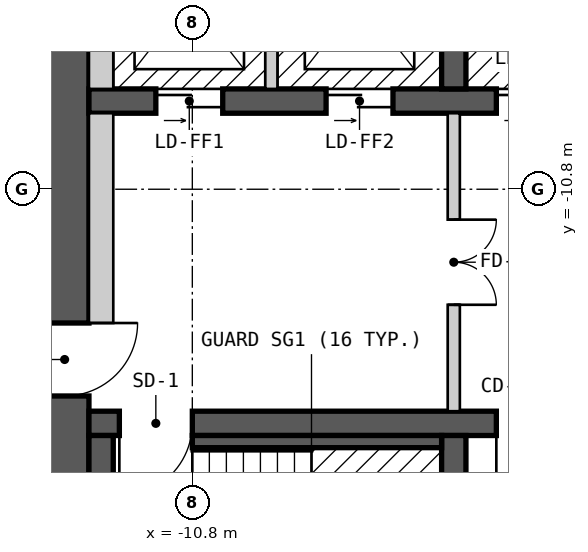
"""IFC4 building model, lengths in metres.
Left out: names, types, materials, properties, quantities, classifications, styles, units other than length and angle.
Written with IfcOpenShell. Run it as: python <this file> out.ifc"""

import sys

from ifc_helpers import new_model, si_unit, direction, frame, frame_2d, origin, place, context, subcontext, project, spatial, rectangle, extrude, element, fill, save


model = new_model("IFC4")
c1 = context("Model", 3, precision=1e-05, world=origin(), true_north=direction((0.0, 1.0)))
c2 = subcontext(c1, "Body", "Model", "MODEL_VIEW")
j1 = project(units=[si_unit("LENGTHUNIT", "METRE"), si_unit("PLANEANGLEUNIT", "RADIAN")], contexts=[c1])
p1 = place(None, origin())
s1 = spatial("IfcSite", under=j1, at=p1, CompositionType="ELEMENT")
p2 = place(p1, origin())
s2 = spatial("IfcBuilding", under=s1, at=p2, CompositionType="ELEMENT")
p3 = place(p2, frame((0.0, 0.0, 135.6)))
s3 = spatial("IfcBuildingStorey", under=s2, at=p3, CompositionType="ELEMENT", Elevation=135.6)
p4 = place(p3, frame((-12.9, -18.2, 0.0), z_axis=(0.0, 0.0, 1.0), x_axis=(0.0, 1.0, 0.0)))
e1 = element("IfcWall", 1, at=p4, inside=s3, PredefinedType="SHEAR", context=c2, shape_type="SweptSolid", body=[
    extrude(rectangle(XDim=12.4, YDim=0.8, at=frame_2d((6.2, 0.0))), origin(), (0.0, 0.0, 1.0), 2.7),
])
p5 = place(p4, frame((4.0, 0.0, 0.0)))
e2 = element("IfcOpeningElement", 2, at=p5, cuts=e1, PredefinedType="OPENING", context=c2, shape_type="SweptSolid", body=[
    extrude(rectangle(XDim=1.2, YDim=2.1, at=frame_2d((0.6, 1.05))), frame((0.0, 0.41, 0.0), z_axis=(0.0, -1.0, 0.0), x_axis=(1.0, 0.0, 0.0)), (0.0, 0.0, 1.0), 0.82),
])
p6 = place(p3, frame((-12.5, -14.65, 0.0), z_axis=(0.0, 0.0, 1.0), x_axis=(1.0, 0.0, 0.0)))
e3 = element("IfcWall", 3, at=p6, inside=s3, PredefinedType="SHEAR", context=c2, shape_type="SweptSolid", body=[
    extrude(rectangle(XDim=25.0, YDim=0.4, at=frame_2d((12.5, 0.0))), origin(), (0.0, 0.0, 1.0), 2.7),
])
p7 = place(p6, frame((1.7, 0.0, 0.0), z_axis=(0.0, 0.0, 1.0), x_axis=(-1.0, 0.0, 0.0)))
e4 = element("IfcOpeningElement", 4, at=p7, cuts=e3, PredefinedType="OPENING", context=c2, shape_type="SweptSolid", body=[
    extrude(rectangle(XDim=1.2, YDim=2.1, at=frame_2d((0.6, 1.05))), frame((0.0, 0.21, 0.0), z_axis=(0.0, -1.0, 0.0), x_axis=(1.0, 0.0, 0.0)), (0.0, 0.0, 1.0), 0.42),
])
p8 = place(p6, frame((24.55, 0.0, 0.0), z_axis=(0.0, 0.0, 1.0), x_axis=(-1.0, 0.0, 0.0)))
e5 = element("IfcOpeningElement", 5, at=p8, cuts=e3, PredefinedType="OPENING", context=c2, shape_type="SweptSolid", body=[
    extrude(rectangle(XDim=1.2, YDim=2.1, at=frame_2d((0.6, 1.05))), frame((0.0, 0.21, 0.0), z_axis=(0.0, -1.0, 0.0), x_axis=(1.0, 0.0, 0.0)), (0.0, 0.0, 1.0), 0.42),
])
p9 = place(p6, frame((7.6, 0.0, 0.0), z_axis=(0.0, 0.0, 1.0), x_axis=(-1.0, 0.0, 0.0)))
e6 = element("IfcOpeningElement", 6, at=p9, cuts=e3, PredefinedType="OPENING", context=c2, shape_type="SweptSolid", body=[
    extrude(rectangle(XDim=0.9, YDim=2.1, at=frame_2d((0.45, 1.05))), frame((0.0, 0.21, 0.0), z_axis=(0.0, -1.0, 0.0), x_axis=(1.0, 0.0, 0.0)), (0.0, 0.0, 1.0), 0.42),
])
p10 = place(p6, frame((9.65, 0.0, 0.0), z_axis=(0.0, 0.0, 1.0), x_axis=(-1.0, 0.0, 0.0)))
e7 = element("IfcOpeningElement", 7, at=p10, cuts=e3, PredefinedType="OPENING", context=c2, shape_type="SweptSolid", body=[
    extrude(rectangle(XDim=0.9, YDim=2.1, at=frame_2d((0.45, 1.05))), frame((0.0, 0.21, 0.0), z_axis=(0.0, -1.0, 0.0), x_axis=(1.0, 0.0, 0.0)), (0.0, 0.0, 1.0), 0.42),
])
p11 = place(p6, frame((11.95, 0.0, 0.0), z_axis=(0.0, 0.0, 1.0), x_axis=(-1.0, 0.0, 0.0)))
e8 = element("IfcOpeningElement", 8, at=p11, cuts=e3, PredefinedType="OPENING", context=c2, shape_type="SweptSolid", body=[
    extrude(rectangle(XDim=1.0, YDim=2.1, at=frame_2d((0.5, 1.05))), frame((0.0, 0.21, 0.0), z_axis=(0.0, -1.0, 0.0), x_axis=(1.0, 0.0, 0.0)), (0.0, 0.0, 1.0), 0.42),
])
p12 = place(p6, frame((14.15, 0.0, 0.0), z_axis=(0.0, 0.0, 1.0), x_axis=(-1.0, 0.0, 0.0)))
e9 = element("IfcOpeningElement", 9, at=p12, cuts=e3, PredefinedType="OPENING", context=c2, shape_type="SweptSolid", body=[
    extrude(rectangle(XDim=0.9, YDim=2.1, at=frame_2d((0.45, 1.05))), frame((0.0, 0.21, 0.0), z_axis=(0.0, -1.0, 0.0), x_axis=(1.0, 0.0, 0.0)), (0.0, 0.0, 1.0), 0.42),
])
p13 = place(p6, frame((16.15, 0.0, 0.0), z_axis=(0.0, 0.0, 1.0), x_axis=(-1.0, 0.0, 0.0)))
e10 = element("IfcOpeningElement", 10, at=p13, cuts=e3, PredefinedType="OPENING", context=c2, shape_type="SweptSolid", body=[
    extrude(rectangle(XDim=0.9, YDim=2.1, at=frame_2d((0.45, 1.05))), frame((0.0, 0.21, 0.0), z_axis=(0.0, -1.0, 0.0), x_axis=(1.0, 0.0, 0.0)), (0.0, 0.0, 1.0), 0.42),
])
p14 = place(p6, frame((18.3, 0.0, 0.0), z_axis=(0.0, 0.0, 1.0), x_axis=(-1.0, 0.0, 0.0)))
e11 = element("IfcOpeningElement", 11, at=p14, cuts=e3, PredefinedType="OPENING", context=c2, shape_type="SweptSolid", body=[
    extrude(rectangle(XDim=1.0, YDim=2.1, at=frame_2d((0.5, 1.05))), frame((0.0, 0.21, 0.0), z_axis=(0.0, -1.0, 0.0), x_axis=(1.0, 0.0, 0.0)), (0.0, 0.0, 1.0), 0.42),
])
p15 = place(p3, frame((-12.5, -9.35, 0.0), z_axis=(0.0, 0.0, 1.0), x_axis=(1.0, 0.0, 0.0)))
e12 = element("IfcWall", 12, at=p15, inside=s3, PredefinedType="SHEAR", context=c2, shape_type="SweptSolid", body=[
    extrude(rectangle(XDim=22.7, YDim=0.4, at=frame_2d((11.35, 0.0))), origin(), (0.0, 0.0, 1.0), 2.7),
])
p16 = place(p15, frame((1.1, 0.0, 0.0)))
e13 = element("IfcOpeningElement", 13, at=p16, cuts=e12, PredefinedType="OPENING", context=c2, shape_type="SweptSolid", body=[
    extrude(rectangle(XDim=1.1, YDim=2.1, at=frame_2d((0.55, 1.05))), frame((0.0, 0.21, 0.0), z_axis=(0.0, -1.0, 0.0), x_axis=(1.0, 0.0, 0.0)), (0.0, 0.0, 1.0), 0.42),
])
p17 = place(p15, frame((3.9, 0.0, 0.0)))
e14 = element("IfcOpeningElement", 14, at=p17, cuts=e12, PredefinedType="OPENING", context=c2, shape_type="SweptSolid", body=[
    extrude(rectangle(XDim=1.1, YDim=2.1, at=frame_2d((0.55, 1.05))), frame((0.0, 0.21, 0.0), z_axis=(0.0, -1.0, 0.0), x_axis=(1.0, 0.0, 0.0)), (0.0, 0.0, 1.0), 0.42),
])
p18 = place(p15, frame((6.7, 0.0, 0.0)))
e15 = element("IfcOpeningElement", 15, at=p18, cuts=e12, PredefinedType="OPENING", context=c2, shape_type="SweptSolid", body=[
    extrude(rectangle(XDim=1.1, YDim=2.1, at=frame_2d((0.55, 1.05))), frame((0.0, 0.21, 0.0), z_axis=(0.0, -1.0, 0.0), x_axis=(1.0, 0.0, 0.0)), (0.0, 0.0, 1.0), 0.42),
])
p19 = place(p15, frame((9.0, 0.0, 0.0)))
e16 = element("IfcOpeningElement", 16, at=p19, cuts=e12, PredefinedType="OPENING", context=c2, shape_type="SweptSolid", body=[
    extrude(rectangle(XDim=1.1, YDim=2.1, at=frame_2d((0.55, 1.05))), frame((0.0, 0.21, 0.0), z_axis=(0.0, -1.0, 0.0), x_axis=(1.0, 0.0, 0.0)), (0.0, 0.0, 1.0), 0.42),
])
p20 = place(p15, frame((11.3, 0.0, 0.0)))
e17 = element("IfcOpeningElement", 17, at=p20, cuts=e12, PredefinedType="OPENING", context=c2, shape_type="SweptSolid", body=[
    extrude(rectangle(XDim=1.1, YDim=2.1, at=frame_2d((0.55, 1.05))), frame((0.0, 0.21, 0.0), z_axis=(0.0, -1.0, 0.0), x_axis=(1.0, 0.0, 0.0)), (0.0, 0.0, 1.0), 0.42),
])
p21 = place(p15, frame((13.6, 0.0, 0.0)))
e18 = element("IfcOpeningElement", 18, at=p21, cuts=e12, PredefinedType="OPENING", context=c2, shape_type="SweptSolid", body=[
    extrude(rectangle(XDim=1.1, YDim=2.1, at=frame_2d((0.55, 1.05))), frame((0.0, 0.21, 0.0), z_axis=(0.0, -1.0, 0.0), x_axis=(1.0, 0.0, 0.0)), (0.0, 0.0, 1.0), 0.42),
])
p22 = place(p15, frame((15.9, 0.0, 0.0)))
e19 = element("IfcOpeningElement", 19, at=p22, cuts=e12, PredefinedType="OPENING", context=c2, shape_type="SweptSolid", body=[
    extrude(rectangle(XDim=1.1, YDim=2.1, at=frame_2d((0.55, 1.05))), frame((0.0, 0.21, 0.0), z_axis=(0.0, -1.0, 0.0), x_axis=(1.0, 0.0, 0.0)), (0.0, 0.0, 1.0), 0.42),
])
p23 = place(p15, frame((18.2, 0.0, 0.0)))
e20 = element("IfcOpeningElement", 20, at=p23, cuts=e12, PredefinedType="OPENING", context=c2, shape_type="SweptSolid", body=[
    extrude(rectangle(XDim=1.1, YDim=2.1, at=frame_2d((0.55, 1.05))), frame((0.0, 0.21, 0.0), z_axis=(0.0, -1.0, 0.0), x_axis=(1.0, 0.0, 0.0)), (0.0, 0.0, 1.0), 0.42),
])
p24 = place(p15, frame((20.6, 0.0, 0.0)))
e21 = element("IfcOpeningElement", 21, at=p24, cuts=e12, PredefinedType="OPENING", context=c2, shape_type="SweptSolid", body=[
    extrude(rectangle(XDim=1.1, YDim=2.1, at=frame_2d((0.55, 1.05))), frame((0.0, 0.21, 0.0), z_axis=(0.0, -1.0, 0.0), x_axis=(1.0, 0.0, 0.0)), (0.0, 0.0, 1.0), 0.42),
])
for number, where, z_axis, x_axis in (
    (22, (-6.5, -18.2, 0.0), (0.0, 0.0, 1.0), (0.0, 1.0, 0.0)),
    (23, (-6.5, -9.15, 0.0), (0.0, 0.0, 1.0), (0.0, 1.0, 0.0)),
):
    element("IfcWall", number, at=place(p3, frame(where, z_axis=z_axis, x_axis=x_axis)), inside=s3, PredefinedType="SHEAR", context=c2, shape_type="SweptSolid", body=[
        extrude(rectangle(XDim=3.35, YDim=0.4, at=frame_2d((1.675, 0.0))), origin(), (0.0, 0.0, 1.0), 2.7),
    ])
p25 = place(p3, frame((-12.3, -18.2, 0.0), z_axis=(0.0, 0.0, 1.0), x_axis=(0.0, 1.0, 0.0)))
e24 = element("IfcWall", 24, at=p25, inside=s3, PredefinedType="SOLIDWALL", context=c2, shape_type="SweptSolid", body=[
    extrude(rectangle(XDim=3.35, YDim=0.4, at=frame_2d((1.675, 0.0))), origin(), (0.0, 0.0, 1.0), 2.7),
])
p26 = place(p3, frame((-12.3, -13.0, 0.0), z_axis=(0.0, 0.0, 1.0), x_axis=(0.0, 1.0, 0.0)))
e25 = element("IfcWall", 25, at=p26, inside=s3, PredefinedType="PARTITIONING", context=c2, shape_type="SweptSolid", body=[
    extrude(rectangle(XDim=3.45, YDim=0.4, at=frame_2d((1.725, 0.0))), origin(), (0.0, 0.0, 1.0), 2.7),
])
p27 = place(p3, frame((-12.3, -9.15, 0.0), z_axis=(0.0, 0.0, 1.0), x_axis=(0.0, 1.0, 0.0)))
e26 = element("IfcWall", 26, at=p27, inside=s3, PredefinedType="SOLIDWALL", context=c2, shape_type="SweptSolid", body=[
    extrude(rectangle(XDim=3.35, YDim=0.4, at=frame_2d((1.675, 0.0))), origin(), (0.0, 0.0, 1.0), 2.7),
])
p28 = place(p3, frame((-10.8, -14.95, 0.0), z_axis=(0.0, 0.0, 1.0), x_axis=(1.0, 0.0, 0.0)))
e27 = element("IfcWall", 27, at=p28, inside=s3, PredefinedType="SOLIDWALL", context=c2, shape_type="SweptSolid", body=[
    extrude(rectangle(XDim=4.1, YDim=0.2, at=frame_2d((2.05, 0.0))), origin(), (0.0, 0.0, 1.0), 2.7),
])
p29 = place(p3, frame((-9.5, -9.15, 0.0), z_axis=(0.0, 0.0, 1.0), x_axis=(0.0, 1.0, 0.0)))
e28 = element("IfcWall", 28, at=p29, inside=s3, PredefinedType="SOLIDWALL", context=c2, shape_type="SweptSolid", body=[
    extrude(rectangle(XDim=2.95, YDim=0.2, at=frame_2d((1.475, 0.0))), origin(), (0.0, 0.0, 1.0), 2.7),
])
p30 = place(p3, frame((-6.5, -14.45, 0.0), z_axis=(0.0, 0.0, 1.0), x_axis=(0.0, 1.0, 0.0)))
e29 = element("IfcWall", 29, at=p30, inside=s3, PredefinedType="PARTITIONING", context=c2, shape_type="SweptSolid", body=[
    extrude(rectangle(XDim=4.9, YDim=0.2, at=frame_2d((2.45, 0.0))), origin(), (0.0, 0.0, 1.0), 2.7),
])
p31 = place(p30, frame((3.15, 0.0, 0.0), z_axis=(0.0, 0.0, 1.0), x_axis=(-1.0, 0.0, 0.0)))
e30 = element("IfcOpeningElement", 30, at=p31, cuts=e29, PredefinedType="OPENING", context=c2, shape_type="SweptSolid", body=[
    extrude(rectangle(XDim=1.4, YDim=2.1, at=frame_2d((0.7, 1.05))), frame((0.0, 0.11, 0.0), z_axis=(0.0, -1.0, 0.0), x_axis=(1.0, 0.0, 0.0)), (0.0, 0.0, 1.0), 0.22),
])
p32 = place(p16, origin())
e31 = element("IfcDoor", 31, at=p32, inside=s3, OperationType="DOUBLE_DOOR_SLIDING", PredefinedType="DOOR", context=c2, shape_type="SweptSolid", body=[
    extrude(rectangle(XDim=1.1, YDim=2.1, at=frame_2d((0.55, 1.05))), frame((0.0, 0.025, 0.0), z_axis=(0.0, -1.0, 0.0), x_axis=(1.0, 0.0, 0.0)), (0.0, 0.0, 1.0), 0.05),
])
fill(e13, e31)
p33 = place(p17, origin())
e32 = element("IfcDoor", 32, at=p33, inside=s3, OperationType="DOUBLE_DOOR_SLIDING", PredefinedType="DOOR", context=c2, shape_type="SweptSolid", body=[
    extrude(rectangle(XDim=1.1, YDim=2.1, at=frame_2d((0.55, 1.05))), frame((0.0, 0.025, 0.0), z_axis=(0.0, -1.0, 0.0), x_axis=(1.0, 0.0, 0.0)), (0.0, 0.0, 1.0), 0.05),
])
fill(e14, e32)
p34 = place(p18, origin())
e33 = element("IfcDoor", 33, at=p34, inside=s3, OperationType="DOUBLE_DOOR_SLIDING", PredefinedType="DOOR", context=c2, shape_type="SweptSolid", body=[
    extrude(rectangle(XDim=1.1, YDim=2.1, at=frame_2d((0.55, 1.05))), frame((0.0, 0.025, 0.0), z_axis=(0.0, -1.0, 0.0), x_axis=(1.0, 0.0, 0.0)), (0.0, 0.0, 1.0), 0.05),
])
fill(e15, e33)
p35 = place(p7, origin())
e34 = element("IfcDoor", 34, at=p35, inside=s3, OperationType="SINGLE_SWING_RIGHT", PredefinedType="DOOR", context=c2, shape_type="SweptSolid", body=[
    extrude(rectangle(XDim=1.2, YDim=2.1, at=frame_2d((0.6, 1.05))), frame((0.0, 0.025, 0.0), z_axis=(0.0, -1.0, 0.0), x_axis=(1.0, 0.0, 0.0)), (0.0, 0.0, 1.0), 0.05),
])
fill(e4, e34)
p36 = place(p5, origin())
e35 = element("IfcDoor", 35, at=p36, inside=s3, OperationType="SINGLE_SWING_RIGHT", PredefinedType="DOOR", context=c2, shape_type="SweptSolid", body=[
    extrude(rectangle(XDim=1.2, YDim=2.1, at=frame_2d((0.6, 1.05))), frame((0.0, 0.025, 0.0), z_axis=(0.0, -1.0, 0.0), x_axis=(1.0, 0.0, 0.0)), (0.0, 0.0, 1.0), 0.05),
])
fill(e2, e35)
p37 = place(p31, origin())
e36 = element("IfcDoor", 36, at=p37, inside=s3, OperationType="DOUBLE_DOOR_SINGLE_SWING", PredefinedType="DOOR", context=c2, shape_type="SweptSolid", body=[
    extrude(rectangle(XDim=1.4, YDim=2.1, at=frame_2d((0.7, 1.05))), frame((0.0, 0.025, 0.0), z_axis=(0.0, -1.0, 0.0), x_axis=(1.0, 0.0, 0.0)), (0.0, 0.0, 1.0), 0.05),
])
fill(e30, e36)
p38 = place(p9, origin())
e37 = element("IfcDoor", 37, at=p38, inside=s3, OperationType="SINGLE_SWING_RIGHT", PredefinedType="DOOR", context=c2, shape_type="SweptSolid", body=[
    extrude(rectangle(XDim=0.9, YDim=2.1, at=frame_2d((0.45, 1.05))), frame((0.0, 0.025, 0.0), z_axis=(0.0, -1.0, 0.0), x_axis=(1.0, 0.0, 0.0)), (0.0, 0.0, 1.0), 0.05),
])
fill(e6, e37)
save(model, sys.argv[1])
